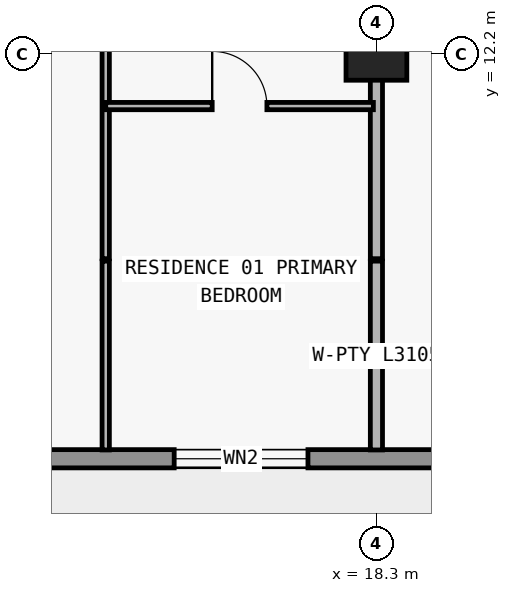
"""IFC4 building model, lengths in metres.
Left out: names, types, materials, properties, quantities, classifications, styles, units other than length and angle.
Written with IfcOpenShell. Run it as: python <this file> out.ifc"""

import sys

from ifc_helpers import new_model, si_unit, direction, frame, frame_2d, origin, origin_2d, place, context, subcontext, project, spatial, rectangle, extrude, element, fill, save


model = new_model("IFC4")
c1 = context("Model", 3, precision=1e-05, world=origin(), true_north=direction((0.0, 1.0)))
c2 = subcontext(c1, "Body", "Model", "MODEL_VIEW")
j1 = project(units=[si_unit("LENGTHUNIT", "METRE"), si_unit("PLANEANGLEUNIT", "RADIAN")], contexts=[c1])
p1 = place(None, origin())
s1 = spatial("IfcSite", under=j1, at=p1, CompositionType="ELEMENT")
p2 = place(p1, origin())
s2 = spatial("IfcBuilding", under=s1, at=p2, CompositionType="ELEMENT")
p3 = place(p2, frame((0.0, 0.0, 87.9)))
s3 = spatial("IfcBuildingStorey", under=s2, at=p3, CompositionType="ELEMENT", Elevation=87.9)
p4 = place(p3, frame((18.3, 12.2, 0.0), z_axis=(0.0, 0.0, 1.0), x_axis=(1.0, 0.0, 0.0)))
e1 = element("IfcColumn", 1, at=p4, inside=s3, PredefinedType="COLUMN", context=c2, shape_type="SweptSolid", body=[
    extrude(rectangle(XDim=1.0, YDim=0.85, at=origin_2d()), origin(), (0.0, 0.0, 1.0), 3.05),
])
p5 = place(p3, frame((70.1, 5.55, 0.0), z_axis=(0.0, 0.0, 1.0), x_axis=(-1.0, 0.0, 0.0)))
e2 = element("IfcWall", 2, at=p5, inside=s3, PredefinedType="STANDARD", context=c2, shape_type="SweptSolid", body=[
    extrude(rectangle(XDim=62.4, YDim=0.3, at=frame_2d((31.2, 0.0))), origin(), (0.0, 0.0, 1.0), 3.05),
])
p6 = place(p5, frame((57.226, 0.0, 0.0)))
e3 = element("IfcOpeningElement", 3, at=p6, cuts=e2, PredefinedType="OPENING", context=c2, shape_type="SweptSolid", body=[
    extrude(rectangle(XDim=2.0, YDim=2.3, at=frame_2d((1.0, 1.15))), frame((0.0, 0.16, 0.0), z_axis=(0.0, -1.0, 0.0), x_axis=(1.0, 0.0, 0.0)), (0.0, 0.0, 1.0), 0.32),
])
p7 = place(p5, frame((52.926, 0.0, 0.85)))
e4 = element("IfcOpeningElement", 4, at=p7, cuts=e2, PredefinedType="OPENING", context=c2, shape_type="SweptSolid", body=[
    extrude(rectangle(XDim=2.2, YDim=1.55, at=frame_2d((1.1, 0.775))), frame((0.0, 0.16, 0.0), z_axis=(0.0, -1.0, 0.0), x_axis=(1.0, 0.0, 0.0)), (0.0, 0.0, 1.0), 0.32),
])
p8 = place(p5, frame((48.49, 0.0, 0.0)))
e5 = element("IfcOpeningElement", 5, at=p8, cuts=e2, PredefinedType="OPENING", context=c2, shape_type="SweptSolid", body=[
    extrude(rectangle(XDim=2.0, YDim=2.3, at=frame_2d((1.0, 1.15))), frame((0.0, 0.16, 0.0), z_axis=(0.0, -1.0, 0.0), x_axis=(1.0, 0.0, 0.0)), (0.0, 0.0, 1.0), 0.32),
])
p9 = place(p5, frame((44.39, 0.0, 0.85)))
e6 = element("IfcOpeningElement", 6, at=p9, cuts=e2, PredefinedType="OPENING", context=c2, shape_type="SweptSolid", body=[
    extrude(rectangle(XDim=1.8, YDim=1.55, at=frame_2d((0.9, 0.775))), frame((0.0, 0.16, 0.0), z_axis=(0.0, -1.0, 0.0), x_axis=(1.0, 0.0, 0.0)), (0.0, 0.0, 1.0), 0.32),
])
p10 = place(p5, frame((40.426, 0.0, 0.0)))
e7 = element("IfcOpeningElement", 7, at=p10, cuts=e2, PredefinedType="OPENING", context=c2, shape_type="SweptSolid", body=[
    extrude(rectangle(XDim=2.0, YDim=2.3, at=frame_2d((1.0, 1.15))), frame((0.0, 0.16, 0.0), z_axis=(0.0, -1.0, 0.0), x_axis=(1.0, 0.0, 0.0)), (0.0, 0.0, 1.0), 0.32),
])
p11 = place(p5, frame((36.126, 0.0, 0.85)))
e8 = element("IfcOpeningElement", 8, at=p11, cuts=e2, PredefinedType="OPENING", context=c2, shape_type="SweptSolid", body=[
    extrude(rectangle(XDim=2.2, YDim=1.55, at=frame_2d((1.1, 0.775))), frame((0.0, 0.16, 0.0), z_axis=(0.0, -1.0, 0.0), x_axis=(1.0, 0.0, 0.0)), (0.0, 0.0, 1.0), 0.32),
])
p12 = place(p5, frame((32.09, 0.0, 0.0)))
e9 = element("IfcOpeningElement", 9, at=p12, cuts=e2, PredefinedType="OPENING", context=c2, shape_type="SweptSolid", body=[
    extrude(rectangle(XDim=2.0, YDim=2.3, at=frame_2d((1.0, 1.15))), frame((0.0, 0.16, 0.0), z_axis=(0.0, -1.0, 0.0), x_axis=(1.0, 0.0, 0.0)), (0.0, 0.0, 1.0), 0.32),
])
p13 = place(p5, frame((28.21, 0.0, 0.65)))
e10 = element("IfcOpeningElement", 10, at=p13, cuts=e2, PredefinedType="OPENING", context=c2, shape_type="SweptSolid", body=[
    extrude(rectangle(XDim=2.6, YDim=1.85, at=frame_2d((1.3, 0.925))), frame((0.0, 0.16, 0.0), z_axis=(0.0, -1.0, 0.0), x_axis=(1.0, 0.0, 0.0)), (0.0, 0.0, 1.0), 0.32),
])
p14 = place(p5, frame((22.1, 0.0, 0.85)))
e11 = element("IfcOpeningElement", 11, at=p14, cuts=e2, PredefinedType="OPENING", context=c2, shape_type="SweptSolid", body=[
    extrude(rectangle(XDim=2.2, YDim=1.55, at=frame_2d((1.1, 0.775))), frame((0.0, 0.16, 0.0), z_axis=(0.0, -1.0, 0.0), x_axis=(1.0, 0.0, 0.0)), (0.0, 0.0, 1.0), 0.32),
])
p15 = place(p5, frame((16.026, 0.0, 0.0)))
e12 = element("IfcOpeningElement", 12, at=p15, cuts=e2, PredefinedType="OPENING", context=c2, shape_type="SweptSolid", body=[
    extrude(rectangle(XDim=2.0, YDim=2.3, at=frame_2d((1.0, 1.15))), frame((0.0, 0.16, 0.0), z_axis=(0.0, -1.0, 0.0), x_axis=(1.0, 0.0, 0.0)), (0.0, 0.0, 1.0), 0.32),
])
p16 = place(p5, frame((11.726, 0.0, 0.85)))
e13 = element("IfcOpeningElement", 13, at=p16, cuts=e2, PredefinedType="OPENING", context=c2, shape_type="SweptSolid", body=[
    extrude(rectangle(XDim=2.2, YDim=1.55, at=frame_2d((1.1, 0.775))), frame((0.0, 0.16, 0.0), z_axis=(0.0, -1.0, 0.0), x_axis=(1.0, 0.0, 0.0)), (0.0, 0.0, 1.0), 0.32),
])
p17 = place(p5, frame((7.29, 0.0, 0.0)))
e14 = element("IfcOpeningElement", 14, at=p17, cuts=e2, PredefinedType="OPENING", context=c2, shape_type="SweptSolid", body=[
    extrude(rectangle(XDim=2.0, YDim=2.3, at=frame_2d((1.0, 1.15))), frame((0.0, 0.16, 0.0), z_axis=(0.0, -1.0, 0.0), x_axis=(1.0, 0.0, 0.0)), (0.0, 0.0, 1.0), 0.32),
])
p18 = place(p5, frame((3.19, 0.0, 0.85)))
e15 = element("IfcOpeningElement", 15, at=p18, cuts=e2, PredefinedType="OPENING", context=c2, shape_type="SweptSolid", body=[
    extrude(rectangle(XDim=1.8, YDim=1.55, at=frame_2d((0.9, 0.775))), frame((0.0, 0.16, 0.0), z_axis=(0.0, -1.0, 0.0), x_axis=(1.0, 0.0, 0.0)), (0.0, 0.0, 1.0), 0.32),
])
p19 = place(p3, frame((13.848, 5.695, 0.0), z_axis=(0.0, 0.0, 1.0), x_axis=(0.0, 1.0, 0.0)))
e16 = element("IfcWall", 16, at=p19, inside=s3, PredefinedType="PARTITIONING", context=c2, shape_type="SweptSolid", body=[
    extrude(rectangle(XDim=3.105, YDim=0.12, at=frame_2d((1.552, 0.0))), origin(), (0.0, 0.0, 1.0), 3.05),
])
p20 = place(p3, frame((13.848, 8.84, 0.0), z_axis=(0.0, 0.0, 1.0), x_axis=(0.0, 1.0, 0.0)))
e17 = element("IfcWall", 17, at=p20, inside=s3, PredefinedType="PARTITIONING", context=c2, shape_type="SweptSolid", body=[
    extrude(rectangle(XDim=13.33, YDim=0.12, at=frame_2d((6.665, 0.0))), origin(), (0.0, 0.0, 1.0), 3.05),
])
p21 = place(p3, frame((18.3, 5.695, 0.0), z_axis=(0.0, 0.0, 1.0), x_axis=(0.0, 1.0, 0.0)))
e18 = element("IfcWall", 18, at=p21, inside=s3, PredefinedType="PARTITIONING", context=c2, shape_type="SweptSolid", body=[
    extrude(rectangle(XDim=3.105, YDim=0.2, at=frame_2d((1.552, 0.0))), origin(), (0.0, 0.0, 1.0), 3.05),
])
p22 = place(p3, frame((18.3, 8.84, 0.0), z_axis=(0.0, 0.0, 1.0), x_axis=(0.0, 1.0, 0.0)))
e19 = element("IfcWall", 19, at=p22, inside=s3, PredefinedType="PARTITIONING", context=c2, shape_type="SweptSolid", body=[
    extrude(rectangle(XDim=13.33, YDim=0.2, at=frame_2d((6.665, 0.0))), origin(), (0.0, 0.0, 1.0), 2.174),
])
p23 = place(p3, frame((13.848, 11.35, 0.0), z_axis=(0.0, 0.0, 1.0), x_axis=(1.0, 0.0, 0.0)))
e20 = element("IfcWall", 20, at=p23, inside=s3, PredefinedType="PARTITIONING", context=c2, shape_type="SweptSolid", body=[
    extrude(rectangle(XDim=4.402, YDim=0.12, at=frame_2d((2.201, 0.0))), origin(), (0.0, 0.0, 1.0), 3.05),
])
p24 = place(p23, frame((1.751, 0.0, 0.0)))
e21 = element("IfcOpeningElement", 21, at=p24, cuts=e20, PredefinedType="OPENING", context=c2, shape_type="SweptSolid", body=[
    extrude(rectangle(XDim=0.9, YDim=2.15, at=frame_2d((0.45, 1.075))), frame((0.0, 0.07, 0.0), z_axis=(0.0, -1.0, 0.0), x_axis=(1.0, 0.0, 0.0)), (0.0, 0.0, 1.0), 0.14),
])
p25 = place(p7, origin())
e22 = element("IfcWindow", 22, at=p25, inside=s3, PartitioningType="SINGLE_PANEL", PredefinedType="WINDOW", context=c2, shape_type="SweptSolid", body=[
    extrude(rectangle(XDim=2.2, YDim=1.55, at=frame_2d((1.1, 0.775))), frame((0.0, 0.03, 0.0), z_axis=(0.0, -1.0, 0.0), x_axis=(1.0, 0.0, 0.0)), (0.0, 0.0, 1.0), 0.06),
])
fill(e4, e22)
p26 = place(p24, origin())
e23 = element("IfcDoor", 23, at=p26, inside=s3, OperationType="SINGLE_SWING_LEFT", PredefinedType="DOOR", context=c2, shape_type="SweptSolid", body=[
    extrude(rectangle(XDim=0.9, YDim=2.15, at=frame_2d((0.45, 1.075))), frame((0.0, 0.025, 0.0), z_axis=(0.0, -1.0, 0.0), x_axis=(1.0, 0.0, 0.0)), (0.0, 0.0, 1.0), 0.05),
])
fill(e21, e23)
save(model, sys.argv[1])
